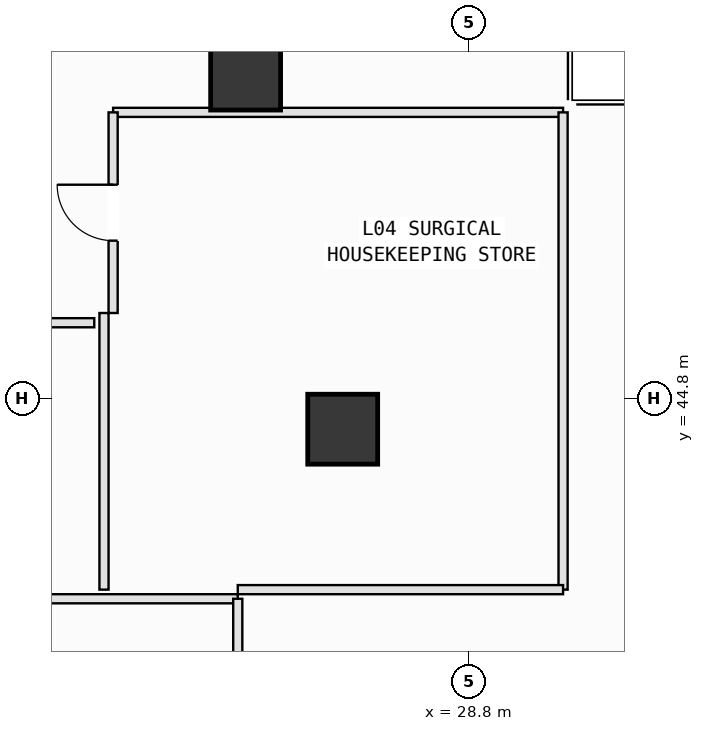
"""IFC4 building model, lengths in metres.
Left out: names, types, materials, properties, quantities, classifications, styles, units other than length and angle.
Written with IfcOpenShell. Run it as: python <this file> out.ifc"""

import sys

from ifc_helpers import new_model, si_unit, direction, frame, frame_2d, origin, origin_2d, place, context, subcontext, project, spatial, rectangle, extrude, element, fill, save


model = new_model("IFC4")
c1 = context("Model", 3, precision=1e-05, world=origin(), true_north=direction((0.0, 1.0)))
c2 = subcontext(c1, "Body", "Model", "MODEL_VIEW")
j1 = project(units=[si_unit("LENGTHUNIT", "METRE"), si_unit("PLANEANGLEUNIT", "RADIAN")], contexts=[c1])
p1 = place(None, origin())
s1 = spatial("IfcSite", under=j1, at=p1, CompositionType="ELEMENT")
p2 = place(p1, origin())
s2 = spatial("IfcBuilding", under=s1, at=p2, CompositionType="ELEMENT")
p3 = place(p2, frame((0.0, 0.0, 21.6)))
s3 = spatial("IfcBuildingStorey", under=s2, at=p3, CompositionType="ELEMENT", Elevation=21.6)
for number, where, z_axis, x_axis in (
    (1, (26.726, 44.289, 0.0), (0.0, 0.0, 1.0), (1.0, 0.0, 0.0)),
    (2, (25.129, 50.113, 0.0), (0.0, 0.0, 1.0), (1.0, 0.0, 0.0)),
):
    element("IfcColumn", number, at=place(p3, frame(where, z_axis=z_axis, x_axis=x_axis)), inside=s3, PredefinedType="COLUMN", context=c2, shape_type="SweptSolid", body=[
        extrude(rectangle(XDim=1.15, YDim=1.15, at=origin_2d()), origin(), (0.0, 0.0, 1.0), 5.4),
    ])
p4 = place(p3, frame((18.15, 41.5, 0.0), z_axis=(0.0, 0.0, 1.0), x_axis=(1.0, 0.0, 0.0)))
e3 = element("IfcWall", 3, at=p4, inside=s3, PredefinedType="PARTITIONING", context=c2, shape_type="SweptSolid", body=[
    extrude(rectangle(XDim=6.85, YDim=0.15, at=frame_2d((3.425, 0.0))), origin(), (0.0, 0.0, 1.0), 5.1),
])
p5 = place(p3, frame((25.0, 41.5, 0.0), z_axis=(0.0, 0.0, 1.0), x_axis=(0.0, -1.0, 0.0)))
e4 = element("IfcWall", 4, at=p5, inside=s3, PredefinedType="PARTITIONING", context=c2, shape_type="SweptSolid", body=[
    extrude(rectangle(XDim=7.15, YDim=0.15, at=frame_2d((3.575, 0.0))), origin(), (0.0, 0.0, 1.0), 5.1),
])
p6 = place(p3, frame((22.8, 46.2, 0.0), z_axis=(0.0, 0.0, 1.0), x_axis=(0.0, -1.0, 0.0)))
e5 = element("IfcWall", 5, at=p6, inside=s3, PredefinedType="PARTITIONING", context=c2, shape_type="SweptSolid", body=[
    extrude(rectangle(XDim=4.55, YDim=0.15, at=frame_2d((2.275, 0.0))), origin(), (0.0, 0.0, 1.0), 5.1),
])
p7 = place(p3, frame((17.91, 46.04, 0.0), z_axis=(0.0, 0.0, 1.0), x_axis=(1.0, 0.0, 0.0)))
e6 = element("IfcWall", 6, at=p7, inside=s3, PredefinedType="PARTITIONING", context=c2, shape_type="SweptSolid", body=[
    extrude(rectangle(XDim=4.73, YDim=0.15, at=frame_2d((2.365, 0.0))), origin(), (0.0, 0.0, 1.0), 5.1),
])
p8 = place(p7, frame((1.835, 0.0, 0.0)))
e7 = element("IfcOpeningElement", 7, at=p8, cuts=e6, PredefinedType="OPENING", context=c2, shape_type="SweptSolid", body=[
    extrude(rectangle(XDim=0.92, YDim=2.1, at=frame_2d((0.46, 1.05))), frame((0.0, 0.085, 0.0), z_axis=(0.0, -1.0, 0.0), x_axis=(1.0, 0.0, 0.0)), (0.0, 0.0, 1.0), 0.17),
])
p9 = place(p3, frame((22.95, 49.5, 0.0), z_axis=(0.0, 0.0, 1.0), x_axis=(1.0, 0.0, 0.0)))
e8 = element("IfcWall", 8, at=p9, inside=s3, PredefinedType="PARTITIONING", context=c2, shape_type="SweptSolid", body=[
    extrude(rectangle(XDim=7.4, YDim=0.15, at=frame_2d((3.7, 0.0))), origin(), (0.0, 0.0, 1.0), 2.685),
])
p10 = place(p3, frame((30.35, 49.5, 0.0), z_axis=(0.0, 0.0, 1.0), x_axis=(0.0, -1.0, 0.0)))
e9 = element("IfcWall", 9, at=p10, inside=s3, PredefinedType="PARTITIONING", context=c2, shape_type="SweptSolid", body=[
    extrude(rectangle(XDim=7.85, YDim=0.15, at=frame_2d((3.925, 0.0))), origin(), (0.0, 0.0, 1.0), 5.1),
])
p11 = place(p3, frame((30.35, 41.65, 0.0), z_axis=(0.0, 0.0, 1.0), x_axis=(-1.0, 0.0, 0.0)))
e10 = element("IfcWall", 10, at=p11, inside=s3, PredefinedType="PARTITIONING", context=c2, shape_type="SweptSolid", body=[
    extrude(rectangle(XDim=5.35, YDim=0.15, at=frame_2d((2.675, 0.0))), origin(), (0.0, 0.0, 1.0), 5.1),
])
p12 = place(p3, frame((22.95, 46.2, 0.0), z_axis=(0.0, 0.0, 1.0), x_axis=(0.0, 1.0, 0.0)))
e11 = element("IfcWall", 11, at=p12, inside=s3, PredefinedType="PARTITIONING", context=c2, shape_type="SweptSolid", body=[
    extrude(rectangle(XDim=3.3, YDim=0.15, at=frame_2d((1.65, 0.0))), origin(), (0.0, 0.0, 1.0), 5.1),
])
p13 = place(p12, frame((1.19, 0.0, 0.0)))
e12 = element("IfcOpeningElement", 12, at=p13, cuts=e11, PredefinedType="OPENING", context=c2, shape_type="SweptSolid", body=[
    extrude(rectangle(XDim=0.92, YDim=2.1, at=frame_2d((0.46, 1.05))), frame((0.0, 0.085, 0.0), z_axis=(0.0, -1.0, 0.0), x_axis=(1.0, 0.0, 0.0)), (0.0, 0.0, 1.0), 0.17),
])
p14 = place(p13, origin())
e13 = element("IfcDoor", 13, at=p14, inside=s3, OperationType="SINGLE_SWING_RIGHT", PredefinedType="DOOR", context=c2, shape_type="SweptSolid", body=[
    extrude(rectangle(XDim=0.92, YDim=2.1, at=frame_2d((0.46, 1.05))), frame((0.0, 0.025, 0.0), z_axis=(0.0, -1.0, 0.0), x_axis=(1.0, 0.0, 0.0)), (0.0, 0.0, 1.0), 0.05),
])
fill(e12, e13)
save(model, sys.argv[1])
